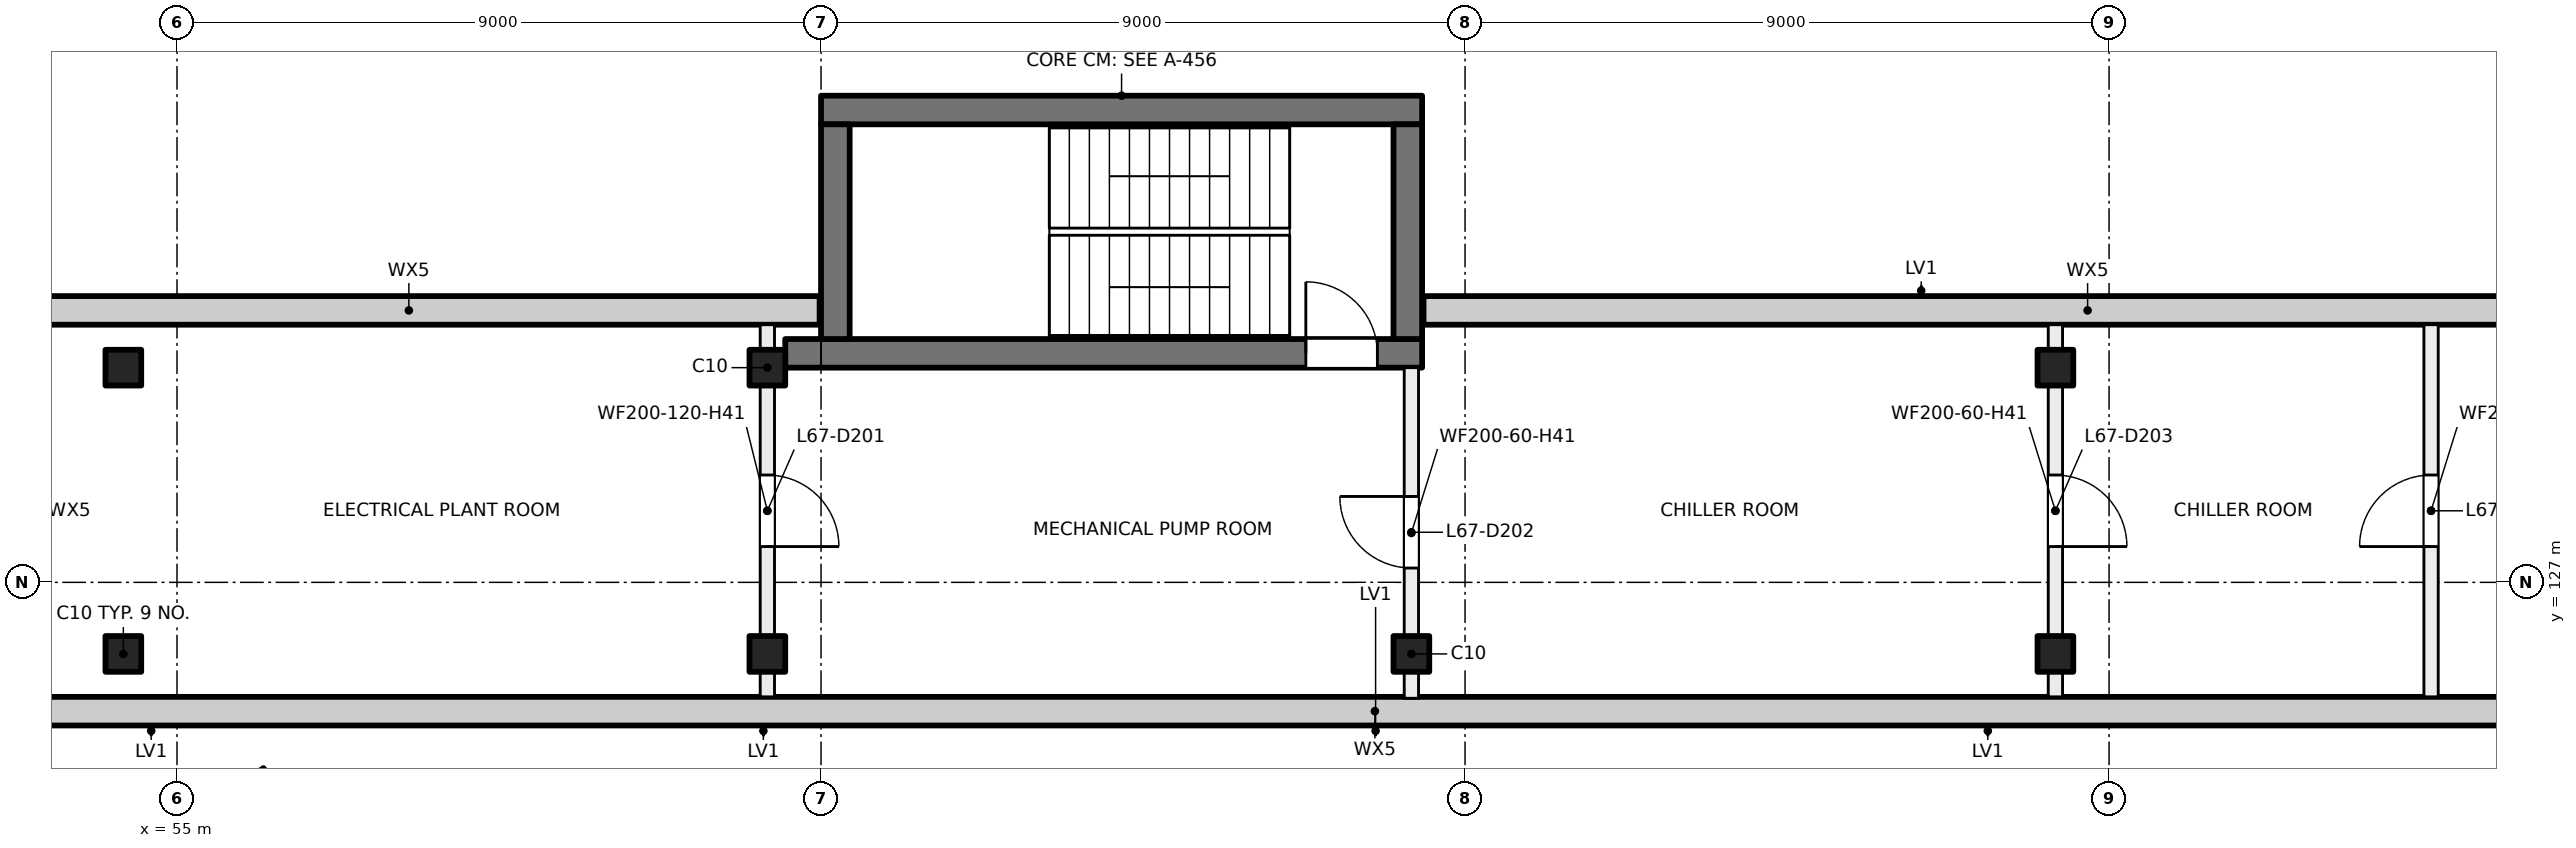
"""IFC4 building model, lengths in metres.
Left out: names, types, materials, properties, quantities, classifications, styles, units other than length and angle.
Written with IfcOpenShell. Run it as: python <this file> out.ifc"""

import sys

from ifc_helpers import new_model, si_unit, direction, frame, frame_2d, origin, origin_2d, place, context, subcontext, project, spatial, rectangle, hollow_rectangle, extrude, element, fill, save


model = new_model("IFC4")
c1 = context("Model", 3, precision=1e-05, world=origin(), true_north=direction((0.0, 1.0)))
c2 = subcontext(c1, "Body", "Model", "MODEL_VIEW")
j1 = project(units=[si_unit("LENGTHUNIT", "METRE"), si_unit("PLANEANGLEUNIT", "RADIAN")], contexts=[c1])
p1 = place(None, origin())
s1 = spatial("IfcSite", under=j1, at=p1, CompositionType="ELEMENT")
p2 = place(p1, origin())
s2 = spatial("IfcBuilding", under=s1, at=p2, CompositionType="ELEMENT")
p3 = place(p2, frame((0.0, 0.0, 282.0)))
s3 = spatial("IfcBuildingStorey", under=s2, at=p3, CompositionType="ELEMENT", Elevation=282.0)
p4 = place(p3, frame((56.036, 123.43, 0.0), z_axis=(0.0, 0.0, 1.0), x_axis=(0.573576436351, -0.819152044289, 0.0)))
e1 = element("IfcColumn", 1, at=p4, inside=s3, PredefinedType="COLUMN", context=c2, shape_type="SweptSolid", body=[
    extrude(hollow_rectangle(XDim=1.4, YDim=1.4, WallThickness=0.025, at=origin_2d()), origin(), (0.0, 0.0, 1.0), 4.5),
])
for number, where, z_axis, x_axis in (
    (2, (54.25, 130.0, 0.0), (0.0, 0.0, 1.0), (1.0, 0.0, 0.0)),
    (3, (63.25, 130.0, 0.0), (0.0, 0.0, 1.0), (1.0, 0.0, 0.0)),
    (4, (81.25, 130.0, 0.0), (0.0, 0.0, 1.0), (1.0, 0.0, 0.0)),
    (5, (54.25, 126.0, 0.0), (0.0, 0.0, 1.0), (1.0, 0.0, 0.0)),
    (6, (63.25, 126.0, 0.0), (0.0, 0.0, 1.0), (1.0, 0.0, 0.0)),
    (7, (72.25, 126.0, 0.0), (0.0, 0.0, 1.0), (1.0, 0.0, 0.0)),
    (8, (81.25, 126.0, 0.0), (0.0, 0.0, 1.0), (1.0, 0.0, 0.0)),
):
    element("IfcColumn", number, at=place(p3, frame(where, z_axis=z_axis, x_axis=x_axis)), inside=s3, PredefinedType="COLUMN", context=c2, shape_type="SweptSolid", body=[
        extrude(rectangle(XDim=0.5, YDim=0.5, at=origin_2d()), origin(), (0.0, 0.0, 1.0), 4.5),
    ])
p5 = place(p3, frame((63.5, 130.2, 0.0), z_axis=(0.0, 0.0, 1.0), x_axis=(1.0, 0.0, 0.0)))
e9 = element("IfcWall", 9, at=p5, inside=s3, PredefinedType="SHEAR", context=c2, shape_type="SweptSolid", body=[
    extrude(rectangle(XDim=8.9, YDim=0.4, at=frame_2d((4.45, 0.0))), origin(), (0.0, 0.0, 1.0), 4.5),
])
p6 = place(p5, frame((7.275, 0.0, 0.0)))
e10 = element("IfcOpeningElement", 10, at=p6, cuts=e9, PredefinedType="OPENING", context=c2, shape_type="SweptSolid", body=[
    extrude(rectangle(XDim=1.0, YDim=2.1, at=frame_2d((0.5, 1.05))), frame((0.0, 0.21, 0.0), z_axis=(0.0, -1.0, 0.0), x_axis=(1.0, 0.0, 0.0)), (0.0, 0.0, 1.0), 0.42),
])
p7 = place(p3, frame((64.0, 133.6, 0.0), z_axis=(0.0, 0.0, 1.0), x_axis=(1.0, 0.0, 0.0)))
e11 = element("IfcWall", 11, at=p7, inside=s3, PredefinedType="SHEAR", context=c2, shape_type="SweptSolid", body=[
    extrude(rectangle(XDim=8.4, YDim=0.4, at=frame_2d((4.2, 0.0))), origin(), (0.0, 0.0, 1.0), 4.5),
])
for number, where, z_axis, x_axis in (
    (12, (64.2, 130.4, 0.0), (0.0, 0.0, 1.0), (0.0, 1.0, 0.0)),
    (13, (72.2, 130.4, 0.0), (0.0, 0.0, 1.0), (0.0, 1.0, 0.0)),
):
    element("IfcWall", number, at=place(p3, frame(where, z_axis=z_axis, x_axis=x_axis)), inside=s3, PredefinedType="SHEAR", context=c2, shape_type="SweptSolid", body=[
        extrude(rectangle(XDim=3.0, YDim=0.4, at=frame_2d((1.5, 0.0))), origin(), (0.0, 0.0, 1.0), 4.5),
    ])
p8 = place(p3, frame((52.5, 130.8, 0.0), z_axis=(0.0, 0.0, 1.0), x_axis=(1.0, 0.0, 0.0)))
e14 = element("IfcWall", 14, at=p8, inside=s3, PredefinedType="SOLIDWALL", context=c2, shape_type="SweptSolid", body=[
    extrude(rectangle(XDim=11.48, YDim=0.4, at=frame_2d((5.74, 0.0))), origin(), (0.0, 0.0, 1.0), 4.125),
])
p9 = place(p3, frame((90.98, 125.2, 0.0), z_axis=(0.0, 0.0, 1.0), x_axis=(-1.0, 0.0, 0.0)))
e15 = element("IfcWall", 15, at=p9, inside=s3, PredefinedType="SOLIDWALL", context=c2, shape_type="SweptSolid", body=[
    extrude(rectangle(XDim=38.48, YDim=0.4, at=frame_2d((19.24, 0.0))), origin(), (0.0, 0.0, 1.0), 4.125),
])
p10 = place(p3, frame((72.42, 130.8, 0.0), z_axis=(0.0, 0.0, 1.0), x_axis=(1.0, 0.0, 0.0)))
e16 = element("IfcWall", 16, at=p10, inside=s3, PredefinedType="SOLIDWALL", context=c2, shape_type="SweptSolid", body=[
    extrude(rectangle(XDim=18.56, YDim=0.4, at=frame_2d((9.28, 0.0))), origin(), (0.0, 0.0, 1.0), 4.125),
])
p11 = place(p3, frame((63.25, 130.6, 0.0), z_axis=(0.0, 0.0, 1.0), x_axis=(0.0, -1.0, 0.0)))
e17 = element("IfcWall", 17, at=p11, inside=s3, PredefinedType="PARTITIONING", context=c2, shape_type="SweptSolid", body=[
    extrude(rectangle(XDim=5.2, YDim=0.2, at=frame_2d((2.6, 0.0))), origin(), (0.0, 0.0, 1.0), 4.125),
])
p12 = place(p11, frame((2.1, 0.0, 0.0)))
e18 = element("IfcOpeningElement", 18, at=p12, cuts=e17, PredefinedType="OPENING", context=c2, shape_type="SweptSolid", body=[
    extrude(rectangle(XDim=1.0, YDim=2.1, at=frame_2d((0.5, 1.05))), frame((0.0, 0.11, 0.0), z_axis=(0.0, -1.0, 0.0), x_axis=(1.0, 0.0, 0.0)), (0.0, 0.0, 1.0), 0.22),
])
p13 = place(p3, frame((72.25, 130.0, 0.0), z_axis=(0.0, 0.0, 1.0), x_axis=(0.0, -1.0, 0.0)))
e19 = element("IfcWall", 19, at=p13, inside=s3, PredefinedType="PARTITIONING", context=c2, shape_type="SweptSolid", body=[
    extrude(rectangle(XDim=4.62, YDim=0.2, at=frame_2d((2.31, 0.0))), origin(), (0.0, 0.0, 1.0), 4.125),
])
p14 = place(p13, frame((1.8, 0.0, 0.0)))
e20 = element("IfcOpeningElement", 20, at=p14, cuts=e19, PredefinedType="OPENING", context=c2, shape_type="SweptSolid", body=[
    extrude(rectangle(XDim=1.0, YDim=2.1, at=frame_2d((0.5, 1.05))), frame((0.0, 0.11, 0.0), z_axis=(0.0, -1.0, 0.0), x_axis=(1.0, 0.0, 0.0)), (0.0, 0.0, 1.0), 0.22),
])
p15 = place(p3, frame((81.25, 130.6, 0.0), z_axis=(0.0, 0.0, 1.0), x_axis=(0.0, -1.0, 0.0)))
e21 = element("IfcWall", 21, at=p15, inside=s3, PredefinedType="PARTITIONING", context=c2, shape_type="SweptSolid", body=[
    extrude(rectangle(XDim=5.2, YDim=0.2, at=frame_2d((2.6, 0.0))), origin(), (0.0, 0.0, 1.0), 4.125),
])
p16 = place(p15, frame((2.1, 0.0, 0.0)))
e22 = element("IfcOpeningElement", 22, at=p16, cuts=e21, PredefinedType="OPENING", context=c2, shape_type="SweptSolid", body=[
    extrude(rectangle(XDim=1.0, YDim=2.1, at=frame_2d((0.5, 1.05))), frame((0.0, 0.11, 0.0), z_axis=(0.0, -1.0, 0.0), x_axis=(1.0, 0.0, 0.0)), (0.0, 0.0, 1.0), 0.22),
])
p17 = place(p3, frame((86.5, 125.4, 0.0), z_axis=(0.0, 0.0, 1.0), x_axis=(0.0, 1.0, 0.0)))
e23 = element("IfcWall", 23, at=p17, inside=s3, PredefinedType="PARTITIONING", context=c2, shape_type="SweptSolid", body=[
    extrude(rectangle(XDim=5.2, YDim=0.2, at=frame_2d((2.6, 0.0))), origin(), (0.0, 0.0, 1.0), 4.125),
])
p18 = place(p17, frame((2.1, 0.0, 0.0)))
e24 = element("IfcOpeningElement", 24, at=p18, cuts=e23, PredefinedType="OPENING", context=c2, shape_type="SweptSolid", body=[
    extrude(rectangle(XDim=1.0, YDim=2.1, at=frame_2d((0.5, 1.05))), frame((0.0, 0.11, 0.0), z_axis=(0.0, -1.0, 0.0), x_axis=(1.0, 0.0, 0.0)), (0.0, 0.0, 1.0), 0.22),
])
p19 = place(p6, origin())
e25 = element("IfcDoor", 25, at=p19, inside=s3, OperationType="SINGLE_SWING_LEFT", PredefinedType="DOOR", context=c2, shape_type="SweptSolid", body=[
    extrude(rectangle(XDim=1.0, YDim=2.1, at=frame_2d((0.5, 1.05))), frame((0.0, 0.025, 0.0), z_axis=(0.0, -1.0, 0.0), x_axis=(1.0, 0.0, 0.0)), (0.0, 0.0, 1.0), 0.05),
])
fill(e10, e25)
p20 = place(p12, origin())
e26 = element("IfcDoor", 26, at=p20, inside=s3, OperationType="SINGLE_SWING_RIGHT", PredefinedType="DOOR", context=c2, shape_type="SweptSolid", body=[
    extrude(rectangle(XDim=1.0, YDim=2.1, at=frame_2d((0.5, 1.05))), frame((0.0, 0.025, 0.0), z_axis=(0.0, -1.0, 0.0), x_axis=(1.0, 0.0, 0.0)), (0.0, 0.0, 1.0), 0.05),
])
fill(e18, e26)
p21 = place(p14, origin())
e27 = element("IfcDoor", 27, at=p21, inside=s3, OperationType="SINGLE_SWING_LEFT", PredefinedType="DOOR", context=c2, shape_type="SweptSolid", body=[
    extrude(rectangle(XDim=1.0, YDim=2.1, at=frame_2d((0.5, 1.05))), frame((0.0, 0.025, 0.0), z_axis=(0.0, -1.0, 0.0), x_axis=(1.0, 0.0, 0.0)), (0.0, 0.0, 1.0), 0.05),
])
fill(e20, e27)
p22 = place(p16, origin())
e28 = element("IfcDoor", 28, at=p22, inside=s3, OperationType="SINGLE_SWING_RIGHT", PredefinedType="DOOR", context=c2, shape_type="SweptSolid", body=[
    extrude(rectangle(XDim=1.0, YDim=2.1, at=frame_2d((0.5, 1.05))), frame((0.0, 0.025, 0.0), z_axis=(0.0, -1.0, 0.0), x_axis=(1.0, 0.0, 0.0)), (0.0, 0.0, 1.0), 0.05),
])
fill(e22, e28)
p23 = place(p18, origin())
e29 = element("IfcDoor", 29, at=p23, inside=s3, OperationType="SINGLE_SWING_LEFT", PredefinedType="DOOR", context=c2, shape_type="SweptSolid", body=[
    extrude(rectangle(XDim=1.0, YDim=2.1, at=frame_2d((0.5, 1.05))), frame((0.0, 0.025, 0.0), z_axis=(0.0, -1.0, 0.0), x_axis=(1.0, 0.0, 0.0)), (0.0, 0.0, 1.0), 0.05),
])
fill(e24, e29)
save(model, sys.argv[1])
